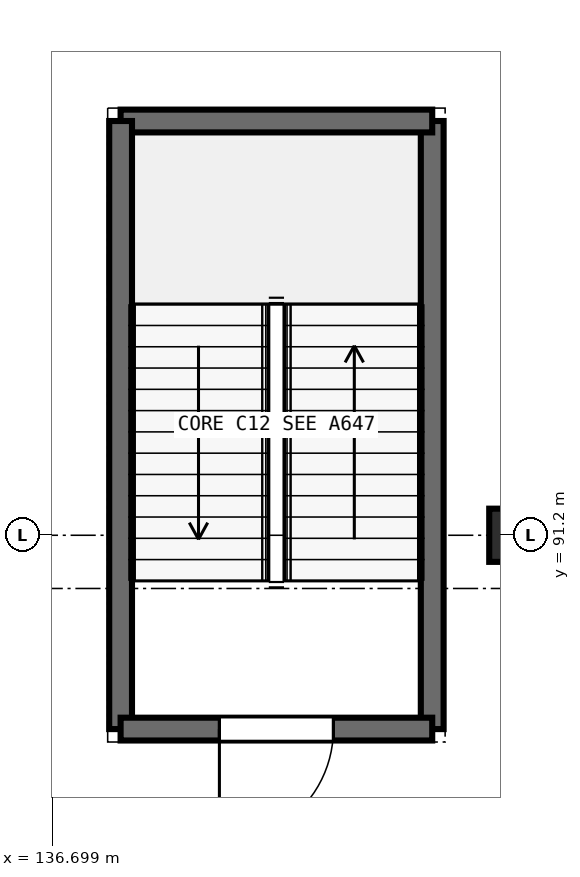
"""IFC4 building model, lengths in metres.
Left out: names, types, materials, properties, quantities, classifications, styles, units other than length and angle.
Written with IfcOpenShell. Run it as: python <this file> out.ifc"""

import sys

from ifc_helpers import new_model, si_unit, direction, frame, frame_2d, origin, origin_2d, place, context, subcontext, project, spatial, rectangle, extrude, element, fill, save


model = new_model("IFC4")
c1 = context("Model", 3, precision=1e-05, world=origin(), true_north=direction((0.0, 1.0)))
c2 = subcontext(c1, "Body", "Model", "MODEL_VIEW")
j1 = project(units=[si_unit("LENGTHUNIT", "METRE"), si_unit("PLANEANGLEUNIT", "RADIAN")], contexts=[c1])
p1 = place(None, origin())
s1 = spatial("IfcSite", under=j1, at=p1, CompositionType="ELEMENT")
p2 = place(p1, origin())
s2 = spatial("IfcBuilding", under=s1, at=p2, CompositionType="ELEMENT")
p3 = place(p2, frame((0.0, 0.0, -4.8)))
s3 = spatial("IfcBuildingStorey", under=s2, at=p3, CompositionType="ELEMENT", Elevation=-4.8)
p4 = place(p3, frame((142.8, 91.2, 0.0), z_axis=(0.0, 0.0, 1.0), x_axis=(1.0, 0.0, 0.0)))
e1 = element("IfcColumn", 1, at=p4, inside=s3, PredefinedType="COLUMN", context=c2, shape_type="SweptSolid", body=[
    extrude(rectangle(XDim=0.7, YDim=0.7, at=origin_2d()), origin(), (0.0, 0.0, 1.0), 4.8),
])
p5 = place(p3, frame((141.7, 88.65, 0.0), z_axis=(0.0, 0.0, 1.0), x_axis=(0.0, 1.0, 0.0)))
e2 = element("IfcWall", 2, at=p5, inside=s3, PredefinedType="SHEAR", context=c2, shape_type="SweptSolid", body=[
    extrude(rectangle(XDim=8.0, YDim=0.3, at=frame_2d((4.0, 0.0))), origin(), (0.0, 0.0, 1.0), 4.8),
])
p6 = place(p3, frame((141.7, 96.65, 0.0), z_axis=(0.0, 0.0, 1.0), x_axis=(-1.0, 0.0, 0.0)))
e3 = element("IfcWall", 3, at=p6, inside=s3, PredefinedType="SHEAR", context=c2, shape_type="SweptSolid", body=[
    extrude(rectangle(XDim=4.1, YDim=0.3, at=frame_2d((2.05, 0.0))), origin(), (0.0, 0.0, 1.0), 4.8),
])
p7 = place(p3, frame((137.6, 96.65, 0.0), z_axis=(0.0, 0.0, 1.0), x_axis=(0.0, -1.0, 0.0)))
e4 = element("IfcWall", 4, at=p7, inside=s3, PredefinedType="SHEAR", context=c2, shape_type="SweptSolid", body=[
    extrude(rectangle(XDim=8.0, YDim=0.3, at=frame_2d((4.0, 0.0))), origin(), (0.0, 0.0, 1.0), 4.8),
])
p8 = place(p3, frame((137.6, 88.65, 0.0), z_axis=(0.0, 0.0, 1.0), x_axis=(1.0, 0.0, 0.0)))
e5 = element("IfcWall", 5, at=p8, inside=s3, PredefinedType="SHEAR", context=c2, shape_type="SweptSolid", body=[
    extrude(rectangle(XDim=4.1, YDim=0.3, at=frame_2d((2.05, 0.0))), origin(), (0.0, 0.0, 1.0), 4.8),
])
p9 = place(p8, frame((1.3, 0.0, 0.0)))
e6 = element("IfcOpeningElement", 6, at=p9, cuts=e5, PredefinedType="OPENING", context=c2, shape_type="SweptSolid", body=[
    extrude(rectangle(XDim=1.5, YDim=2.2, at=frame_2d((0.75, 1.1))), frame((0.0, 0.16, 0.0), z_axis=(0.0, -1.0, 0.0), x_axis=(1.0, 0.0, 0.0)), (0.0, 0.0, 1.0), 0.32),
])
p10 = place(p9, frame((1.5, 0.0, 0.0), z_axis=(0.0, 0.0, 1.0), x_axis=(-1.0, 0.0, 0.0)))
e7 = element("IfcDoor", 7, at=p10, inside=s3, OperationType="SINGLE_SWING_RIGHT", PredefinedType="DOOR", context=c2, shape_type="SweptSolid", body=[
    extrude(rectangle(XDim=1.5, YDim=2.2, at=frame_2d((0.75, 1.1))), frame((0.0, 0.025, 0.0), z_axis=(0.0, -1.0, 0.0), x_axis=(1.0, 0.0, 0.0)), (0.0, 0.0, 1.0), 0.05),
])
fill(e6, e7)
save(model, sys.argv[1])
